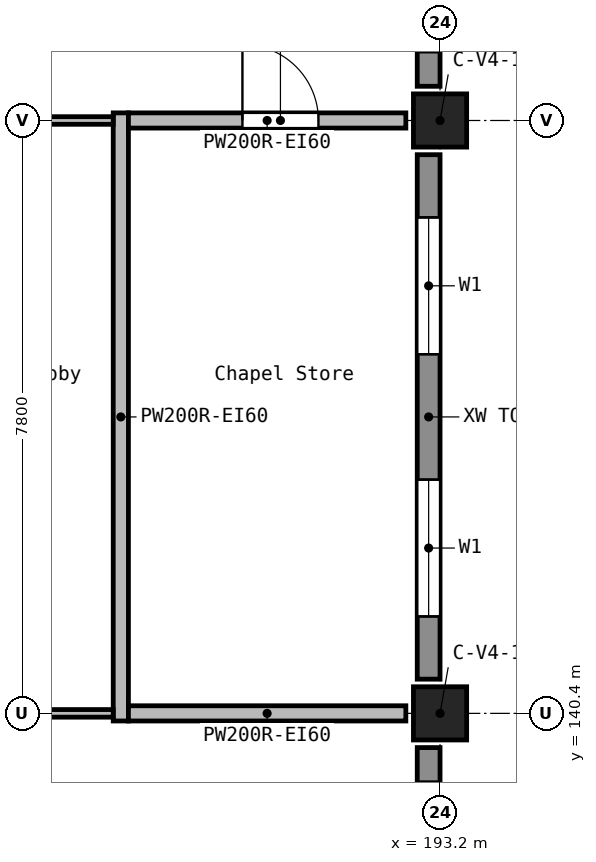
"""IFC4 building model, lengths in metres.
Left out: names, types, materials, properties, quantities, classifications, styles, units other than length and angle.
Written with IfcOpenShell. Run it as: python <this file> out.ifc"""

import sys

from ifc_helpers import new_model, si_unit, direction, frame, frame_2d, origin, origin_2d, place, context, subcontext, project, spatial, rectangle, extrude, element, fill, save


model = new_model("IFC4")
c1 = context("Model", 3, precision=1e-05, world=origin(), true_north=direction((0.0, 1.0)))
c2 = subcontext(c1, "Body", "Model", "MODEL_VIEW")
j1 = project(units=[si_unit("LENGTHUNIT", "METRE"), si_unit("PLANEANGLEUNIT", "RADIAN")], contexts=[c1])
p1 = place(None, origin())
s1 = spatial("IfcSite", under=j1, at=p1, CompositionType="ELEMENT")
p2 = place(p1, origin())
s2 = spatial("IfcBuilding", under=s1, at=p2, CompositionType="ELEMENT")
p3 = place(p2, frame((0.0, 0.0, 12.6)))
s3 = spatial("IfcBuildingStorey", under=s2, at=p3, CompositionType="ELEMENT", Elevation=12.6)
for number, where, z_axis, x_axis in (
    (1, (193.2, 140.4, 0.0), (0.0, 0.0, 1.0), (1.0, 0.0, 0.0)),
    (2, (193.2, 148.2, 0.0), (0.0, 0.0, 1.0), (1.0, 0.0, 0.0)),
):
    element("IfcColumn", number, at=place(p3, frame(where, z_axis=z_axis, x_axis=x_axis)), inside=s3, PredefinedType="COLUMN", context=c2, shape_type="SweptSolid", body=[
        extrude(rectangle(XDim=0.7, YDim=0.7, at=origin_2d()), origin(), (0.0, 0.0, 1.0), 4.2),
    ])
p4 = place(p3, frame((193.05, 137.25, 0.0), z_axis=(0.0, 0.0, 1.0), x_axis=(0.0, 1.0, 0.0)))
e3 = element("IfcWall", 3, at=p4, inside=s3, PredefinedType="STANDARD", context=c2, shape_type="SweptSolid", body=[
    extrude(rectangle(XDim=2.7, YDim=0.3, at=frame_2d((1.35, 0.0))), origin(), (0.0, 0.0, 1.0), 3.05),
])
p5 = place(p4, frame((0.45, 0.0, 0.9)))
e4 = element("IfcOpeningElement", 4, at=p5, cuts=e3, PredefinedType="OPENING", context=c2, shape_type="SweptSolid", body=[
    extrude(rectangle(XDim=1.8, YDim=1.5, at=frame_2d((0.9, 0.75))), frame((0.0, 0.16, 0.0), z_axis=(0.0, -1.0, 0.0), x_axis=(1.0, 0.0, 0.0)), (0.0, 0.0, 1.0), 0.32),
])
p6 = place(p3, frame((193.05, 140.85, 0.0), z_axis=(0.0, 0.0, 1.0), x_axis=(0.0, 1.0, 0.0)))
e5 = element("IfcWall", 5, at=p6, inside=s3, PredefinedType="STANDARD", context=c2, shape_type="SweptSolid", body=[
    extrude(rectangle(XDim=6.9, YDim=0.3, at=frame_2d((3.45, 0.0))), origin(), (0.0, 0.0, 1.0), 3.05),
])
p7 = place(p6, frame((0.825, 0.0, 0.9)))
e6 = element("IfcOpeningElement", 6, at=p7, cuts=e5, PredefinedType="OPENING", context=c2, shape_type="SweptSolid", body=[
    extrude(rectangle(XDim=1.8, YDim=1.5, at=frame_2d((0.9, 0.75))), frame((0.0, 0.16, 0.0), z_axis=(0.0, -1.0, 0.0), x_axis=(1.0, 0.0, 0.0)), (0.0, 0.0, 1.0), 0.32),
])
p8 = place(p6, frame((4.275, 0.0, 0.9)))
e7 = element("IfcOpeningElement", 7, at=p8, cuts=e5, PredefinedType="OPENING", context=c2, shape_type="SweptSolid", body=[
    extrude(rectangle(XDim=1.8, YDim=1.5, at=frame_2d((0.9, 0.75))), frame((0.0, 0.16, 0.0), z_axis=(0.0, -1.0, 0.0), x_axis=(1.0, 0.0, 0.0)), (0.0, 0.0, 1.0), 0.32),
])
p9 = place(p3, frame((193.05, 148.65, 0.0), z_axis=(0.0, 0.0, 1.0), x_axis=(0.0, 1.0, 0.0)))
e8 = element("IfcWall", 8, at=p9, inside=s3, PredefinedType="STANDARD", context=c2, shape_type="SweptSolid", body=[
    extrude(rectangle(XDim=2.7, YDim=0.3, at=frame_2d((1.35, 0.0))), origin(), (0.0, 0.0, 1.0), 3.05),
])
p10 = place(p9, frame((0.45, 0.0, 0.9)))
e9 = element("IfcOpeningElement", 9, at=p10, cuts=e8, PredefinedType="OPENING", context=c2, shape_type="SweptSolid", body=[
    extrude(rectangle(XDim=1.8, YDim=1.5, at=frame_2d((0.9, 0.75))), frame((0.0, 0.16, 0.0), z_axis=(0.0, -1.0, 0.0), x_axis=(1.0, 0.0, 0.0)), (0.0, 0.0, 1.0), 0.32),
])
p11 = place(p3, frame((189.0, 140.3, 0.0), z_axis=(0.0, 0.0, 1.0), x_axis=(0.0, 1.0, 0.0)))
e10 = element("IfcWall", 10, at=p11, inside=s3, PredefinedType="SOLIDWALL", context=c2, shape_type="SweptSolid", body=[
    extrude(rectangle(XDim=8.0, YDim=0.2, at=frame_2d((4.0, 0.0))), origin(), (0.0, 0.0, 1.0), 3.85),
])
p12 = place(p3, frame((189.1, 140.4, 0.0), z_axis=(0.0, 0.0, 1.0), x_axis=(1.0, 0.0, 0.0)))
e11 = element("IfcWall", 11, at=p12, inside=s3, PredefinedType="SOLIDWALL", context=c2, shape_type="SweptSolid", body=[
    extrude(rectangle(XDim=3.65, YDim=0.2, at=frame_2d((1.825, 0.0))), origin(), (0.0, 0.0, 1.0), 3.85),
])
p13 = place(p3, frame((189.1, 148.2, 0.0), z_axis=(0.0, 0.0, 1.0), x_axis=(1.0, 0.0, 0.0)))
e12 = element("IfcWall", 12, at=p13, inside=s3, PredefinedType="SOLIDWALL", context=c2, shape_type="SweptSolid", body=[
    extrude(rectangle(XDim=3.65, YDim=0.2, at=frame_2d((1.825, 0.0))), origin(), (0.0, 0.0, 1.0), 3.85),
])
p14 = place(p13, frame((1.5, 0.0, 0.0)))
e13 = element("IfcOpeningElement", 13, at=p14, cuts=e12, PredefinedType="OPENING", context=c2, shape_type="SweptSolid", body=[
    extrude(rectangle(XDim=1.0, YDim=2.1, at=frame_2d((0.5, 1.05))), frame((0.0, 0.11, 0.0), z_axis=(0.0, -1.0, 0.0), x_axis=(1.0, 0.0, 0.0)), (0.0, 0.0, 1.0), 0.22),
])
p15 = place(p3, frame((188.9, 140.4, 0.0), z_axis=(0.0, 0.0, 1.0), x_axis=(-1.0, 0.0, 0.0)))
e14 = element("IfcWall", 14, at=p15, inside=s3, PredefinedType="PARTITIONING", context=c2, shape_type="SweptSolid", body=[
    extrude(rectangle(XDim=3.65, YDim=0.1, at=frame_2d((1.825, 0.0))), origin(), (0.0, 0.0, 1.0), 3.85),
])
p16 = place(p3, frame((188.9, 148.2, 0.0), z_axis=(0.0, 0.0, 1.0), x_axis=(-1.0, 0.0, 0.0)))
e15 = element("IfcWall", 15, at=p16, inside=s3, PredefinedType="PARTITIONING", context=c2, shape_type="SweptSolid", body=[
    extrude(rectangle(XDim=3.65, YDim=0.1, at=frame_2d((1.825, 0.0))), origin(), (0.0, 0.0, 1.0), 3.85),
])
p17 = place(p16, frame((1.55, 0.0, 0.0)))
e16 = element("IfcOpeningElement", 16, at=p17, cuts=e15, PredefinedType="OPENING", context=c2, shape_type="SweptSolid", body=[
    extrude(rectangle(XDim=0.9, YDim=2.1, at=frame_2d((0.45, 1.05))), frame((0.0, 0.06, 0.0), z_axis=(0.0, -1.0, 0.0), x_axis=(1.0, 0.0, 0.0)), (0.0, 0.0, 1.0), 0.12),
])
p18 = place(p7, origin())
e17 = element("IfcWindow", 17, at=p18, inside=s3, PartitioningType="SINGLE_PANEL", PredefinedType="WINDOW", context=c2, shape_type="SweptSolid", body=[
    extrude(rectangle(XDim=1.8, YDim=1.5, at=frame_2d((0.9, 0.75))), frame((0.0, 0.03, 0.0), z_axis=(0.0, -1.0, 0.0), x_axis=(1.0, 0.0, 0.0)), (0.0, 0.0, 1.0), 0.06),
])
fill(e6, e17)
p19 = place(p8, origin())
e18 = element("IfcWindow", 18, at=p19, inside=s3, PartitioningType="SINGLE_PANEL", PredefinedType="WINDOW", context=c2, shape_type="SweptSolid", body=[
    extrude(rectangle(XDim=1.8, YDim=1.5, at=frame_2d((0.9, 0.75))), frame((0.0, 0.03, 0.0), z_axis=(0.0, -1.0, 0.0), x_axis=(1.0, 0.0, 0.0)), (0.0, 0.0, 1.0), 0.06),
])
fill(e7, e18)
p20 = place(p10, origin())
e19 = element("IfcWindow", 19, at=p20, inside=s3, PartitioningType="SINGLE_PANEL", PredefinedType="WINDOW", context=c2, shape_type="SweptSolid", body=[
    extrude(rectangle(XDim=1.8, YDim=1.5, at=frame_2d((0.9, 0.75))), frame((0.0, 0.03, 0.0), z_axis=(0.0, -1.0, 0.0), x_axis=(1.0, 0.0, 0.0)), (0.0, 0.0, 1.0), 0.06),
])
fill(e9, e19)
p21 = place(p14, frame((1.0, 0.0, 0.0), z_axis=(0.0, 0.0, 1.0), x_axis=(-1.0, 0.0, 0.0)))
e20 = element("IfcDoor", 20, at=p21, inside=s3, OperationType="SINGLE_SWING_LEFT", PredefinedType="DOOR", context=c2, shape_type="SweptSolid", body=[
    extrude(rectangle(XDim=1.0, YDim=2.1, at=frame_2d((0.5, 1.05))), frame((0.0, 0.025, 0.0), z_axis=(0.0, -1.0, 0.0), x_axis=(1.0, 0.0, 0.0)), (0.0, 0.0, 1.0), 0.05),
])
fill(e13, e20)
save(model, sys.argv[1])
